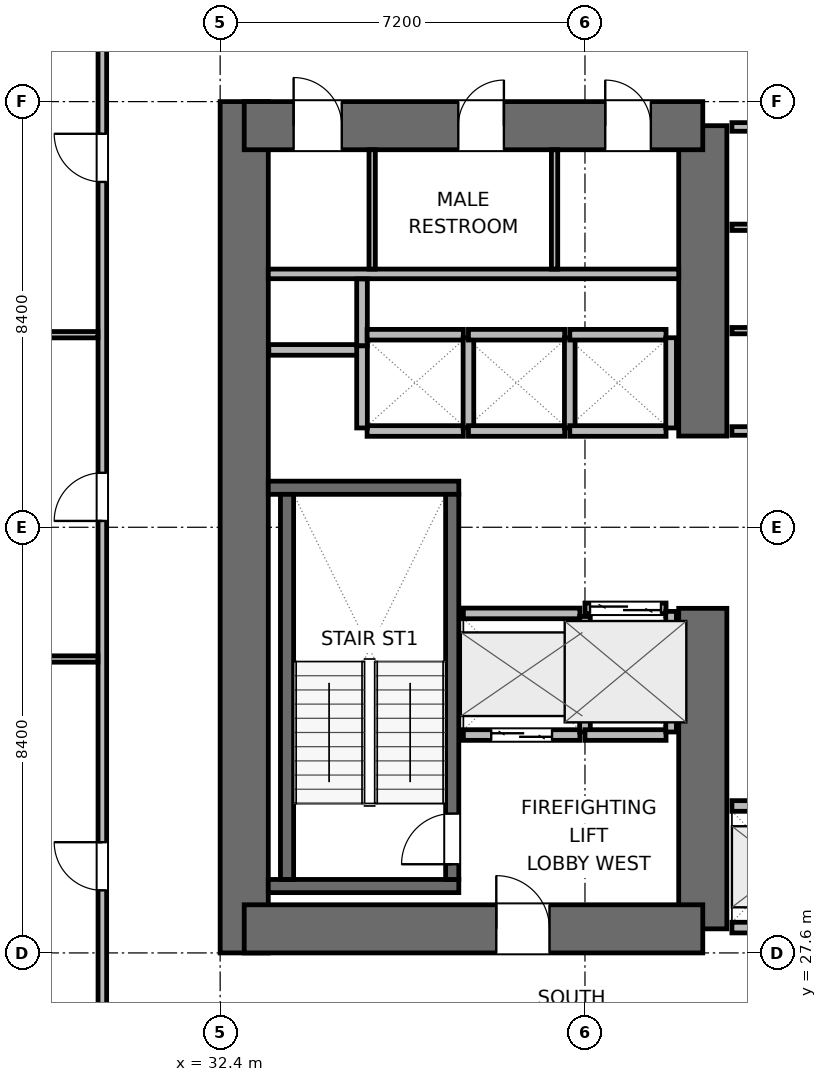
"""IFC4 building model, lengths in metres.
Left out: names, types, materials, properties, quantities, classifications, styles, units other than length and angle.
Written with IfcOpenShell. Run it as: python <this file> out.ifc"""

import sys

from ifc_helpers import new_model, si_unit, direction, frame, frame_2d, origin, place, context, subcontext, project, spatial, rectangle, extrude, element, fill, save


model = new_model("IFC4")
c1 = context("Model", 3, precision=1e-05, world=origin(), true_north=direction((0.0, 1.0)))
c2 = subcontext(c1, "Body", "Model", "MODEL_VIEW")
j1 = project(units=[si_unit("LENGTHUNIT", "METRE"), si_unit("PLANEANGLEUNIT", "RADIAN")], contexts=[c1])
p1 = place(None, origin())
s1 = spatial("IfcSite", under=j1, at=p1, CompositionType="ELEMENT")
p2 = place(p1, origin())
s2 = spatial("IfcBuilding", under=s1, at=p2, CompositionType="ELEMENT")
p3 = place(p2, frame((0.0, 0.0, 37.2)))
s3 = spatial("IfcBuildingStorey", under=s2, at=p3, CompositionType="ELEMENT", Elevation=37.2)
p4 = place(p3, frame((32.875, 27.6, 0.0), z_axis=(0.0, 0.0, 1.0), x_axis=(0.0, 1.0, 0.0)))
e1 = element("IfcWall", 1, at=p4, inside=s3, PredefinedType="SHEAR", context=c2, shape_type="SweptSolid", body=[
    extrude(rectangle(XDim=16.8, YDim=0.95, at=frame_2d((8.4, 0.0))), origin(), (0.0, 0.0, 1.0), 3.9),
])
p5 = place(p3, frame((41.925, 28.075, 0.0), z_axis=(0.0, 0.0, 1.0), x_axis=(0.0, 1.0, 0.0)))
e2 = element("IfcWall", 2, at=p5, inside=s3, PredefinedType="SHEAR", context=c2, shape_type="SweptSolid", body=[
    extrude(rectangle(XDim=6.325, YDim=0.95, at=frame_2d((3.163, 0.0))), origin(), (0.0, 0.0, 1.0), 3.9),
])
p6 = place(p3, frame((41.925, 37.8, 0.0), z_axis=(0.0, 0.0, 1.0), x_axis=(0.0, 1.0, 0.0)))
e3 = element("IfcWall", 3, at=p6, inside=s3, PredefinedType="SHEAR", context=c2, shape_type="SweptSolid", body=[
    extrude(rectangle(XDim=6.125, YDim=0.95, at=frame_2d((3.062, 0.0))), origin(), (0.0, 0.0, 1.0), 3.9),
])
p7 = place(p3, frame((32.875, 28.075, 0.0), z_axis=(0.0, 0.0, 1.0), x_axis=(1.0, 0.0, 0.0)))
e4 = element("IfcWall", 4, at=p7, inside=s3, PredefinedType="SHEAR", context=c2, shape_type="SweptSolid", body=[
    extrude(rectangle(XDim=9.05, YDim=0.95, at=frame_2d((4.525, 0.0))), origin(), (0.0, 0.0, 1.0), 3.9),
])
p8 = place(p7, frame((4.975, 0.0, 0.0)))
e5 = element("IfcOpeningElement", 5, at=p8, cuts=e4, PredefinedType="OPENING", context=c2, shape_type="SweptSolid", body=[
    extrude(rectangle(XDim=1.05, YDim=2.04, at=frame_2d((0.525, 1.02))), frame((0.0, 0.485, 0.0), z_axis=(0.0, -1.0, 0.0), x_axis=(1.0, 0.0, 0.0)), (0.0, 0.0, 1.0), 0.97),
])
p9 = place(p3, frame((32.875, 43.925, 0.0), z_axis=(0.0, 0.0, 1.0), x_axis=(1.0, 0.0, 0.0)))
e6 = element("IfcWall", 6, at=p9, inside=s3, PredefinedType="SHEAR", context=c2, shape_type="SweptSolid", body=[
    extrude(rectangle(XDim=9.05, YDim=0.95, at=frame_2d((4.525, 0.0))), origin(), (0.0, 0.0, 1.0), 3.9),
])
p10 = place(p9, frame((0.975, 0.0, 0.0)))
e7 = element("IfcOpeningElement", 7, at=p10, cuts=e6, PredefinedType="OPENING", context=c2, shape_type="SweptSolid", body=[
    extrude(rectangle(XDim=0.95, YDim=2.04, at=frame_2d((0.475, 1.02))), frame((0.0, 0.485, 0.0), z_axis=(0.0, -1.0, 0.0), x_axis=(1.0, 0.0, 0.0)), (0.0, 0.0, 1.0), 0.97),
])
p11 = place(p9, frame((4.225, 0.0, 0.0)))
e8 = element("IfcOpeningElement", 8, at=p11, cuts=e6, PredefinedType="OPENING", context=c2, shape_type="SweptSolid", body=[
    extrude(rectangle(XDim=0.9, YDim=2.02, at=frame_2d((0.45, 1.01))), frame((0.0, 0.485, 0.0), z_axis=(0.0, -1.0, 0.0), x_axis=(1.0, 0.0, 0.0)), (0.0, 0.0, 1.0), 0.97),
])
p12 = place(p9, frame((7.125, 0.0, 0.0)))
e9 = element("IfcOpeningElement", 9, at=p12, cuts=e6, PredefinedType="OPENING", context=c2, shape_type="SweptSolid", body=[
    extrude(rectangle(XDim=0.9, YDim=2.02, at=frame_2d((0.45, 1.01))), frame((0.0, 0.485, 0.0), z_axis=(0.0, -1.0, 0.0), x_axis=(1.0, 0.0, 0.0)), (0.0, 0.0, 1.0), 0.97),
])
for number, where, z_axis, x_axis in (
    (10, (33.35, 28.92, 0.0), (0.0, 0.0, 1.0), (1.0, 0.0, 0.0)),
    (11, (33.35, 36.78, 0.0), (0.0, 0.0, 1.0), (1.0, 0.0, 0.0)),
):
    element("IfcWall", number, at=place(p3, frame(where, z_axis=z_axis, x_axis=x_axis)), inside=s3, PredefinedType="SHEAR", context=c2, shape_type="SweptSolid", body=[
        extrude(rectangle(XDim=3.76, YDim=0.26, at=frame_2d((1.88, 0.0))), origin(), (0.0, 0.0, 1.0), 3.9),
    ])
p13 = place(p3, frame((33.72, 29.05, 0.0), z_axis=(0.0, 0.0, 1.0), x_axis=(0.0, 1.0, 0.0)))
e12 = element("IfcWall", 12, at=p13, inside=s3, PredefinedType="SHEAR", context=c2, shape_type="SweptSolid", body=[
    extrude(rectangle(XDim=7.6, YDim=0.26, at=frame_2d((3.8, 0.0))), origin(), (0.0, 0.0, 1.0), 3.9),
])
p14 = place(p3, frame((36.98, 29.05, 0.0), z_axis=(0.0, 0.0, 1.0), x_axis=(0.0, 1.0, 0.0)))
e13 = element("IfcWall", 13, at=p14, inside=s3, PredefinedType="SHEAR", context=c2, shape_type="SweptSolid", body=[
    extrude(rectangle(XDim=7.6, YDim=0.26, at=frame_2d((3.8, 0.0))), origin(), (0.0, 0.0, 1.0), 3.9),
])
p15 = place(p14, frame((0.3, 0.0, 0.0)))
e14 = element("IfcOpeningElement", 14, at=p15, cuts=e13, PredefinedType="OPENING", context=c2, shape_type="SweptSolid", body=[
    extrude(rectangle(XDim=1.0, YDim=2.04, at=frame_2d((0.5, 1.02))), frame((0.0, 0.14, 0.0), z_axis=(0.0, -1.0, 0.0), x_axis=(1.0, 0.0, 0.0)), (0.0, 0.0, 1.0), 0.28),
])
p16 = place(p3, frame((33.35, 41.0, 0.0), z_axis=(0.0, 0.0, 1.0), x_axis=(1.0, 0.0, 0.0)))
e15 = element("IfcWall", 15, at=p16, inside=s3, PredefinedType="PLUMBINGWALL", context=c2, shape_type="SweptSolid", body=[
    extrude(rectangle(XDim=8.1, YDim=0.19, at=frame_2d((4.05, 0.0))), origin(), (0.0, 0.0, 1.0), 3.64),
])
for number, where, z_axis, x_axis in (
    (16, (35.4, 41.095, 0.0), (0.0, 0.0, 1.0), (0.0, 1.0, 0.0)),
    (17, (39.0, 41.095, 0.0), (0.0, 0.0, 1.0), (0.0, 1.0, 0.0)),
):
    element("IfcWall", number, at=place(p3, frame(where, z_axis=z_axis, x_axis=x_axis)), inside=s3, PredefinedType="PARTITIONING", context=c2, shape_type="SweptSolid", body=[
        extrude(rectangle(XDim=2.355, YDim=0.125, at=frame_2d((1.177, 0.0))), origin(), (0.0, 0.0, 1.0), 3.64),
    ])
p17 = place(p3, frame((33.36, 39.5, 0.0), z_axis=(0.0, 0.0, 1.0), x_axis=(1.0, 0.0, 0.0)))
e18 = element("IfcWall", 18, at=p17, inside=s3, PredefinedType="PARTITIONING", context=c2, shape_type="SweptSolid", body=[
    extrude(rectangle(XDim=1.86, YDim=0.21, at=frame_2d((0.93, 0.0))), origin(), (0.0, 0.0, 1.0), 3.64),
])
p18 = place(p3, frame((35.2, 39.58, 0.0), z_axis=(0.0, 0.0, 1.0), x_axis=(0.0, 1.0, 0.0)))
e19 = element("IfcWall", 19, at=p18, inside=s3, PredefinedType="PARTITIONING", context=c2, shape_type="SweptSolid", body=[
    extrude(rectangle(XDim=1.32, YDim=0.21, at=frame_2d((0.66, 0.0))), origin(), (0.0, 0.0, 1.0), 3.64),
])
p19 = place(p3, frame((37.2, 31.9, 0.0), z_axis=(0.0, 0.0, 1.0), x_axis=(1.0, 0.0, 0.0)))
e20 = element("IfcWall", 20, at=p19, inside=s3, PredefinedType="PARTITIONING", context=c2, shape_type="SweptSolid", body=[
    extrude(rectangle(XDim=2.3, YDim=0.21, at=frame_2d((1.15, 0.0))), origin(), (0.0, 0.0, 1.0), 3.64),
])
p20 = place(p19, frame((0.55, 0.0, 0.0)))
e21 = element("IfcOpeningElement", 21, at=p20, cuts=e20, PredefinedType="OPENING", context=c2, shape_type="SweptSolid", body=[
    extrude(rectangle(XDim=1.2, YDim=2.04, at=frame_2d((0.6, 1.02))), frame((0.0, 0.115, 0.0), z_axis=(0.0, -1.0, 0.0), x_axis=(1.0, 0.0, 0.0)), (0.0, 0.0, 1.0), 0.23),
])
p21 = place(p3, frame((37.2, 34.3, 0.0), z_axis=(0.0, 0.0, 1.0), x_axis=(1.0, 0.0, 0.0)))
e22 = element("IfcWall", 22, at=p21, inside=s3, PredefinedType="PARTITIONING", context=c2, shape_type="SweptSolid", body=[
    extrude(rectangle(XDim=2.3, YDim=0.21, at=frame_2d((1.15, 0.0))), origin(), (0.0, 0.0, 1.0), 3.64),
])
p22 = place(p3, frame((39.6, 31.96, 0.0), z_axis=(0.0, 0.0, 1.0), x_axis=(0.0, 1.0, 0.0)))
e23 = element("IfcWall", 23, at=p22, inside=s3, PredefinedType="PARTITIONING", context=c2, shape_type="SweptSolid", body=[
    extrude(rectangle(XDim=2.28, YDim=0.21, at=frame_2d((1.14, 0.0))), origin(), (0.0, 0.0, 1.0), 3.64),
])
p23 = place(p3, frame((39.6, 34.4, 0.0), z_axis=(0.0, 0.0, 1.0), x_axis=(1.0, 0.0, 0.0)))
e24 = element("IfcWall", 24, at=p23, inside=s3, PredefinedType="PARTITIONING", context=c2, shape_type="SweptSolid", body=[
    extrude(rectangle(XDim=1.6, YDim=0.21, at=frame_2d((0.8, 0.0))), origin(), (0.0, 0.0, 1.0), 3.64),
])
p24 = place(p23, frame((0.1, 0.0, 0.0)))
e25 = element("IfcOpeningElement", 25, at=p24, cuts=e24, PredefinedType="OPENING", context=c2, shape_type="SweptSolid", body=[
    extrude(rectangle(XDim=1.4, YDim=2.06, at=frame_2d((0.7, 1.03))), frame((0.0, 0.115, 0.0), z_axis=(0.0, -1.0, 0.0), x_axis=(1.0, 0.0, 0.0)), (0.0, 0.0, 1.0), 0.23),
])
p25 = place(p3, frame((39.6, 31.9, 0.0), z_axis=(0.0, 0.0, 1.0), x_axis=(1.0, 0.0, 0.0)))
e26 = element("IfcWall", 26, at=p25, inside=s3, PredefinedType="PARTITIONING", context=c2, shape_type="SweptSolid", body=[
    extrude(rectangle(XDim=1.6, YDim=0.21, at=frame_2d((0.8, 0.0))), origin(), (0.0, 0.0, 1.0), 3.64),
])
p26 = place(p3, frame((41.3, 31.96, 0.0), z_axis=(0.0, 0.0, 1.0), x_axis=(0.0, 1.0, 0.0)))
e27 = element("IfcWall", 27, at=p26, inside=s3, PredefinedType="PARTITIONING", context=c2, shape_type="SweptSolid", body=[
    extrude(rectangle(XDim=2.38, YDim=0.21, at=frame_2d((1.19, 0.0))), origin(), (0.0, 0.0, 1.0), 3.64),
])
p27 = place(p3, frame((42.5, 30.5, 0.0), z_axis=(0.0, 0.0, 1.0), x_axis=(1.0, 0.0, 0.0)))
e28 = element("IfcWall", 28, at=p27, inside=s3, PredefinedType="PARTITIONING", context=c2, shape_type="SweptSolid", body=[
    extrude(rectangle(XDim=2.1, YDim=0.21, at=frame_2d((1.05, 0.0))), origin(), (0.0, 0.0, 1.0), 3.64),
])
p28 = place(p27, frame((0.5, 0.0, 0.0)))
e29 = element("IfcOpeningElement", 29, at=p28, cuts=e28, PredefinedType="OPENING", context=c2, shape_type="SweptSolid", body=[
    extrude(rectangle(XDim=1.1, YDim=2.04, at=frame_2d((0.55, 1.02))), frame((0.0, 0.115, 0.0), z_axis=(0.0, -1.0, 0.0), x_axis=(1.0, 0.0, 0.0)), (0.0, 0.0, 1.0), 0.23),
])
p29 = place(p3, frame((42.5, 28.1, 0.0), z_axis=(0.0, 0.0, 1.0), x_axis=(1.0, 0.0, 0.0)))
e30 = element("IfcWall", 30, at=p29, inside=s3, PredefinedType="PARTITIONING", context=c2, shape_type="SweptSolid", body=[
    extrude(rectangle(XDim=2.1, YDim=0.21, at=frame_2d((1.05, 0.0))), origin(), (0.0, 0.0, 1.0), 2.525),
])
for number, where, z_axis, x_axis in (
    (31, (35.3, 37.9, 0.0), (0.0, 0.0, 1.0), (1.0, 0.0, 0.0)),
    (32, (35.3, 39.8, 0.0), (0.0, 0.0, 1.0), (1.0, 0.0, 0.0)),
):
    element("IfcWall", number, at=place(p3, frame(where, z_axis=z_axis, x_axis=x_axis)), inside=s3, PredefinedType="PARTITIONING", context=c2, shape_type="SweptSolid", body=[
        extrude(rectangle(XDim=1.9, YDim=0.21, at=frame_2d((0.95, 0.0))), origin(), (0.0, 0.0, 1.0), 3.64),
    ])
p30 = place(p3, frame((35.2, 37.96, 0.0), z_axis=(0.0, 0.0, 1.0), x_axis=(0.0, 1.0, 0.0)))
e33 = element("IfcWall", 33, at=p30, inside=s3, PredefinedType="PARTITIONING", context=c2, shape_type="SweptSolid", body=[
    extrude(rectangle(XDim=1.62, YDim=0.21, at=frame_2d((0.81, 0.0))), origin(), (0.0, 0.0, 1.0), 3.64),
])
p31 = place(p3, frame((37.3, 37.96, 0.0), z_axis=(0.0, 0.0, 1.0), x_axis=(0.0, 1.0, 0.0)))
e34 = element("IfcWall", 34, at=p31, inside=s3, PredefinedType="PARTITIONING", context=c2, shape_type="SweptSolid", body=[
    extrude(rectangle(XDim=1.78, YDim=0.21, at=frame_2d((0.89, 0.0))), origin(), (0.0, 0.0, 1.0), 3.64),
])
for number, where, z_axis, x_axis in (
    (35, (37.3, 37.9, 0.0), (0.0, 0.0, 1.0), (1.0, 0.0, 0.0)),
    (36, (37.3, 39.8, 0.0), (0.0, 0.0, 1.0), (1.0, 0.0, 0.0)),
):
    element("IfcWall", number, at=place(p3, frame(where, z_axis=z_axis, x_axis=x_axis)), inside=s3, PredefinedType="PARTITIONING", context=c2, shape_type="SweptSolid", body=[
        extrude(rectangle(XDim=1.9, YDim=0.21, at=frame_2d((0.95, 0.0))), origin(), (0.0, 0.0, 1.0), 3.64),
    ])
p32 = place(p3, frame((39.3, 37.96, 0.0), z_axis=(0.0, 0.0, 1.0), x_axis=(0.0, 1.0, 0.0)))
e37 = element("IfcWall", 37, at=p32, inside=s3, PredefinedType="PARTITIONING", context=c2, shape_type="SweptSolid", body=[
    extrude(rectangle(XDim=1.78, YDim=0.21, at=frame_2d((0.89, 0.0))), origin(), (0.0, 0.0, 1.0), 3.64),
])
for number, where, z_axis, x_axis in (
    (38, (39.3, 37.9, 0.0), (0.0, 0.0, 1.0), (1.0, 0.0, 0.0)),
    (39, (39.3, 39.8, 0.0), (0.0, 0.0, 1.0), (1.0, 0.0, 0.0)),
):
    element("IfcWall", number, at=place(p3, frame(where, z_axis=z_axis, x_axis=x_axis)), inside=s3, PredefinedType="PARTITIONING", context=c2, shape_type="SweptSolid", body=[
        extrude(rectangle(XDim=1.9, YDim=0.21, at=frame_2d((0.95, 0.0))), origin(), (0.0, 0.0, 1.0), 3.64),
    ])
p33 = place(p3, frame((41.3, 37.96, 0.0), z_axis=(0.0, 0.0, 1.0), x_axis=(0.0, 1.0, 0.0)))
e40 = element("IfcWall", 40, at=p33, inside=s3, PredefinedType="PARTITIONING", context=c2, shape_type="SweptSolid", body=[
    extrude(rectangle(XDim=1.78, YDim=0.21, at=frame_2d((0.89, 0.0))), origin(), (0.0, 0.0, 1.0), 3.64),
])
p34 = place(p3, frame((42.5, 37.9, 0.0), z_axis=(0.0, 0.0, 1.0), x_axis=(1.0, 0.0, 0.0)))
e41 = element("IfcWall", 41, at=p34, inside=s3, PredefinedType="PARTITIONING", context=c2, shape_type="SweptSolid", body=[
    extrude(rectangle(XDim=4.213, YDim=0.17, at=frame_2d((2.106, 0.0))), origin(), (0.0, 0.0, 1.0), 3.64),
])
p35 = place(p3, frame((42.5, 43.9, 0.0), z_axis=(0.0, 0.0, 1.0), x_axis=(1.0, 0.0, 0.0)))
e42 = element("IfcWall", 42, at=p35, inside=s3, PredefinedType="PARTITIONING", context=c2, shape_type="SweptSolid", body=[
    extrude(rectangle(XDim=4.213, YDim=0.17, at=frame_2d((2.106, 0.0))), origin(), (0.0, 0.0, 1.0), 2.525),
])
for number, where, z_axis, x_axis in (
    (43, (42.5, 39.88, 0.0), (0.0, 0.0, 1.0), (1.0, 0.0, 0.0)),
    (44, (42.5, 41.92, 0.0), (0.0, 0.0, 1.0), (1.0, 0.0, 0.0)),
):
    element("IfcWall", number, at=place(p3, frame(where, z_axis=z_axis, x_axis=x_axis)), inside=s3, PredefinedType="PARTITIONING", context=c2, shape_type="SweptSolid", body=[
        extrude(rectangle(XDim=4.213, YDim=0.125, at=frame_2d((2.106, 0.0))), origin(), (0.0, 0.0, 1.0), 3.64),
    ])
p36 = place(p3, frame((30.075, 25.307, 0.0), z_axis=(0.0, 0.0, 1.0), x_axis=(0.0, 1.0, 0.0)))
e45 = element("IfcWall", 45, at=p36, inside=s3, PredefinedType="PARTITIONING", context=c2, shape_type="SweptSolid", body=[
    extrude(rectangle(XDim=21.386, YDim=0.17, at=frame_2d((10.693, 0.0))), origin(), (0.0, 0.0, 1.0), 3.64),
])
p37 = place(p36, frame((3.528, 0.0, 0.0)))
e46 = element("IfcOpeningElement", 46, at=p37, cuts=e45, PredefinedType="OPENING", context=c2, shape_type="SweptSolid", body=[
    extrude(rectangle(XDim=0.95, YDim=2.04, at=frame_2d((0.475, 1.02))), frame((0.0, 0.095, 0.0), z_axis=(0.0, -1.0, 0.0), x_axis=(1.0, 0.0, 0.0)), (0.0, 0.0, 1.0), 0.19),
])
p38 = place(p36, frame((10.818, 0.0, 0.0)))
e47 = element("IfcOpeningElement", 47, at=p38, cuts=e45, PredefinedType="OPENING", context=c2, shape_type="SweptSolid", body=[
    extrude(rectangle(XDim=0.95, YDim=2.04, at=frame_2d((0.475, 1.02))), frame((0.0, 0.095, 0.0), z_axis=(0.0, -1.0, 0.0), x_axis=(1.0, 0.0, 0.0)), (0.0, 0.0, 1.0), 0.19),
])
p39 = place(p36, frame((17.508, 0.0, 0.0)))
e48 = element("IfcOpeningElement", 48, at=p39, cuts=e45, PredefinedType="OPENING", context=c2, shape_type="SweptSolid", body=[
    extrude(rectangle(XDim=0.95, YDim=2.04, at=frame_2d((0.475, 1.02))), frame((0.0, 0.095, 0.0), z_axis=(0.0, -1.0, 0.0), x_axis=(1.0, 0.0, 0.0)), (0.0, 0.0, 1.0), 0.19),
])
p40 = place(p3, frame((20.375, 33.4, 0.0), z_axis=(0.0, 0.0, 1.0), x_axis=(1.0, 0.0, 0.0)))
e49 = element("IfcWall", 49, at=p40, inside=s3, PredefinedType="PARTITIONING", context=c2, shape_type="SweptSolid", body=[
    extrude(rectangle(XDim=9.613, YDim=0.125, at=frame_2d((4.807, 0.0))), origin(), (0.0, 0.0, 1.0), 3.64),
])
p41 = place(p3, frame((18.245, 39.8, 0.0), z_axis=(0.0, 0.0, 1.0), x_axis=(1.0, 0.0, 0.0)))
e50 = element("IfcWall", 50, at=p41, inside=s3, PredefinedType="PARTITIONING", context=c2, shape_type="SweptSolid", body=[
    extrude(rectangle(XDim=11.743, YDim=0.125, at=frame_2d((5.872, 0.0))), origin(), (0.0, 0.0, 1.0), 3.64),
])
p42 = place(p15, origin())
e51 = element("IfcDoor", 51, at=p42, inside=s3, OperationType="SINGLE_SWING_LEFT", PredefinedType="DOOR", context=c2, shape_type="SweptSolid", body=[
    extrude(rectangle(XDim=1.0, YDim=2.04, at=frame_2d((0.5, 1.02))), frame((0.0, 0.025, 0.0), z_axis=(0.0, -1.0, 0.0), x_axis=(1.0, 0.0, 0.0)), (0.0, 0.0, 1.0), 0.05),
])
fill(e14, e51)
p43 = place(p20, origin())
e52 = element("IfcDoor", 52, at=p43, inside=s3, OperationType="DOUBLE_DOOR_SLIDING", PredefinedType="DOOR", context=c2, shape_type="SweptSolid", body=[
    extrude(rectangle(XDim=1.2, YDim=2.04, at=frame_2d((0.6, 1.02))), frame((0.0, 0.025, 0.0), z_axis=(0.0, -1.0, 0.0), x_axis=(1.0, 0.0, 0.0)), (0.0, 0.0, 1.0), 0.05),
])
fill(e21, e52)
p44 = place(p24, origin())
e53 = element("IfcDoor", 53, at=p44, inside=s3, OperationType="DOUBLE_DOOR_SLIDING", PredefinedType="DOOR", context=c2, shape_type="SweptSolid", body=[
    extrude(rectangle(XDim=1.4, YDim=2.06, at=frame_2d((0.7, 1.03))), frame((0.0, 0.025, 0.0), z_axis=(0.0, -1.0, 0.0), x_axis=(1.0, 0.0, 0.0)), (0.0, 0.0, 1.0), 0.05),
])
fill(e25, e53)
p45 = place(p8, origin())
e54 = element("IfcDoor", 54, at=p45, inside=s3, OperationType="SINGLE_SWING_LEFT", PredefinedType="DOOR", context=c2, shape_type="SweptSolid", body=[
    extrude(rectangle(XDim=1.05, YDim=2.04, at=frame_2d((0.525, 1.02))), frame((0.0, 0.025, 0.0), z_axis=(0.0, -1.0, 0.0), x_axis=(1.0, 0.0, 0.0)), (0.0, 0.0, 1.0), 0.05),
])
fill(e5, e54)
p46 = place(p10, origin())
e55 = element("IfcDoor", 55, at=p46, inside=s3, OperationType="SINGLE_SWING_LEFT", PredefinedType="DOOR", context=c2, shape_type="SweptSolid", body=[
    extrude(rectangle(XDim=0.95, YDim=2.04, at=frame_2d((0.475, 1.02))), frame((0.0, 0.025, 0.0), z_axis=(0.0, -1.0, 0.0), x_axis=(1.0, 0.0, 0.0)), (0.0, 0.0, 1.0), 0.05),
])
fill(e7, e55)
p47 = place(p11, origin())
e56 = element("IfcDoor", 56, at=p47, inside=s3, OperationType="SINGLE_SWING_RIGHT", PredefinedType="DOOR", context=c2, shape_type="SweptSolid", body=[
    extrude(rectangle(XDim=0.9, YDim=2.02, at=frame_2d((0.45, 1.01))), frame((0.0, 0.025, 0.0), z_axis=(0.0, -1.0, 0.0), x_axis=(1.0, 0.0, 0.0)), (0.0, 0.0, 1.0), 0.05),
])
fill(e8, e56)
p48 = place(p12, origin())
e57 = element("IfcDoor", 57, at=p48, inside=s3, OperationType="SINGLE_SWING_LEFT", PredefinedType="DOOR", context=c2, shape_type="SweptSolid", body=[
    extrude(rectangle(XDim=0.9, YDim=2.02, at=frame_2d((0.45, 1.01))), frame((0.0, 0.025, 0.0), z_axis=(0.0, -1.0, 0.0), x_axis=(1.0, 0.0, 0.0)), (0.0, 0.0, 1.0), 0.05),
])
fill(e9, e57)
p49 = place(p37, origin())
e58 = element("IfcDoor", 58, at=p49, inside=s3, OperationType="SINGLE_SWING_RIGHT", PredefinedType="DOOR", context=c2, shape_type="SweptSolid", body=[
    extrude(rectangle(XDim=0.95, YDim=2.04, at=frame_2d((0.475, 1.02))), frame((0.0, 0.025, 0.0), z_axis=(0.0, -1.0, 0.0), x_axis=(1.0, 0.0, 0.0)), (0.0, 0.0, 1.0), 0.05),
])
fill(e46, e58)
p50 = place(p38, origin())
e59 = element("IfcDoor", 59, at=p50, inside=s3, OperationType="SINGLE_SWING_LEFT", PredefinedType="DOOR", context=c2, shape_type="SweptSolid", body=[
    extrude(rectangle(XDim=0.95, YDim=2.04, at=frame_2d((0.475, 1.02))), frame((0.0, 0.025, 0.0), z_axis=(0.0, -1.0, 0.0), x_axis=(1.0, 0.0, 0.0)), (0.0, 0.0, 1.0), 0.05),
])
fill(e47, e59)
p51 = place(p39, origin())
e60 = element("IfcDoor", 60, at=p51, inside=s3, OperationType="SINGLE_SWING_RIGHT", PredefinedType="DOOR", context=c2, shape_type="SweptSolid", body=[
    extrude(rectangle(XDim=0.95, YDim=2.04, at=frame_2d((0.475, 1.02))), frame((0.0, 0.025, 0.0), z_axis=(0.0, -1.0, 0.0), x_axis=(1.0, 0.0, 0.0)), (0.0, 0.0, 1.0), 0.05),
])
fill(e48, e60)
save(model, sys.argv[1])
